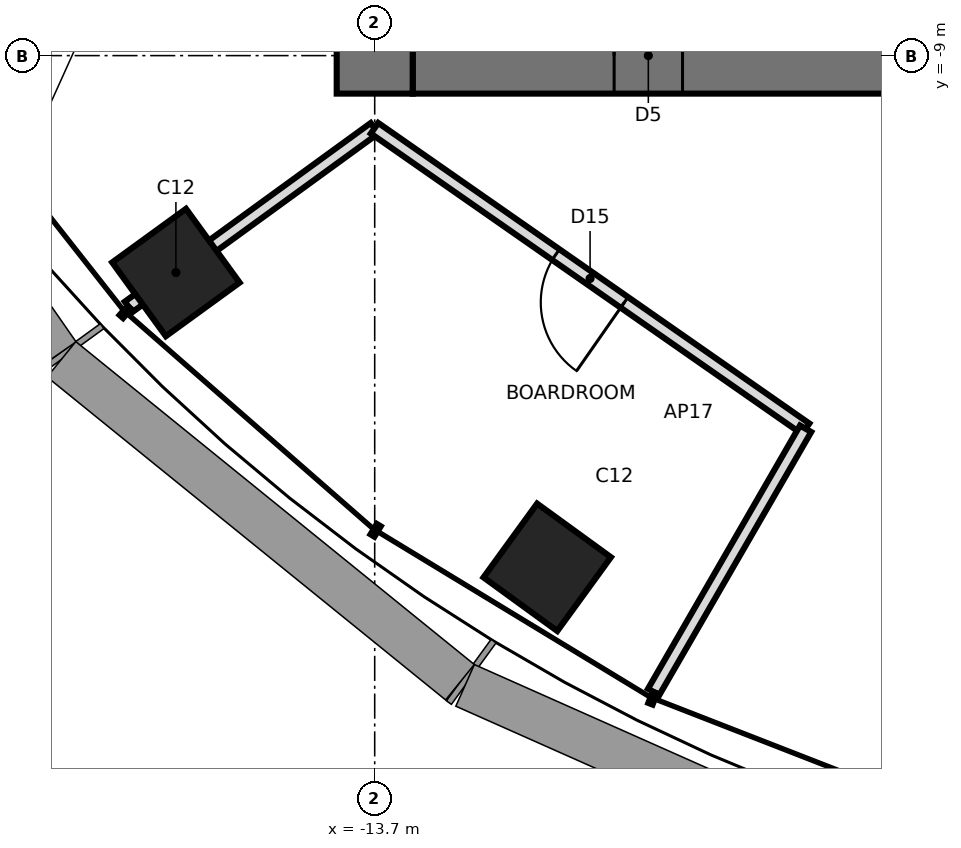
"""IFC4 building model, lengths in metres.
Left out: names, types, materials, properties, quantities, classifications, styles, units other than length and angle.
Written with IfcOpenShell. Run it as: python <this file> out.ifc"""

import sys

from ifc_helpers import new_model, si_unit, direction, frame, frame_2d, origin, origin_2d, place, context, subcontext, project, spatial, rectangle, extrude, element, fill, save


model = new_model("IFC4")
c1 = context("Model", 3, precision=1e-05, world=origin(), true_north=direction((0.0, 1.0)))
c2 = subcontext(c1, "Body", "Model", "MODEL_VIEW")
j1 = project(units=[si_unit("LENGTHUNIT", "METRE"), si_unit("PLANEANGLEUNIT", "RADIAN")], contexts=[c1])
p1 = place(None, origin())
s1 = spatial("IfcSite", under=j1, at=p1, CompositionType="ELEMENT")
p2 = place(p1, origin())
s2 = spatial("IfcBuilding", under=s1, at=p2, CompositionType="ELEMENT")
p3 = place(p2, frame((0.0, 0.0, 264.4)))
s3 = spatial("IfcBuildingStorey", under=s2, at=p3, CompositionType="ELEMENT", Elevation=264.4)
for number, where, z_axis, x_axis in (
    (1, (-16.315, -11.854, 0.0), (0.0, 0.0, 1.0), (-0.809, -0.588, 0.0)),
    (2, (-11.43, -15.733, 0.0), (0.0, 0.0, 1.0), (-0.588, -0.809, 0.0)),
):
    element("IfcColumn", number, at=place(p3, frame(where, z_axis=z_axis, x_axis=x_axis)), inside=s3, PredefinedType="COLUMN", context=c2, shape_type="SweptSolid", body=[
        extrude(rectangle(XDim=1.2, YDim=1.2, at=origin_2d()), origin(), (0.0, 0.0, 1.0), 4.2),
    ])
p4 = place(p3, frame((-13.2, -9.0, 0.0), z_axis=(0.0, 0.0, 1.0), x_axis=(1.0, 0.0, 0.0)))
e3 = element("IfcWall", 3, at=p4, inside=s3, PredefinedType="SHEAR", context=c2, shape_type="SweptSolid", body=[
    extrude(rectangle(XDim=26.4, YDim=1.0, at=frame_2d((13.2, 0.0))), origin(), (0.0, 0.0, 1.0), 4.2),
])
p5 = place(p4, frame((2.65, 0.0, 0.0)))
e4 = element("IfcOpeningElement", 4, at=p5, cuts=e3, PredefinedType="OPENING", context=c2, shape_type="SweptSolid", body=[
    extrude(rectangle(XDim=0.9, YDim=2.1, at=frame_2d((0.45, 1.05))), frame((0.0, 0.51, 0.0), z_axis=(0.0, -1.0, 0.0), x_axis=(1.0, 0.0, 0.0)), (0.0, 0.0, 1.0), 1.02),
])
p6 = place(p4, frame((9.5, 0.0, 0.0)))
e5 = element("IfcOpeningElement", 5, at=p6, cuts=e3, PredefinedType="OPENING", context=c2, shape_type="SweptSolid", body=[
    extrude(rectangle(XDim=0.9, YDim=2.1, at=frame_2d((0.45, 1.05))), frame((0.0, 0.51, 0.0), z_axis=(0.0, -1.0, 0.0), x_axis=(1.0, 0.0, 0.0)), (0.0, 0.0, 1.0), 1.02),
])
p7 = place(p4, frame((16.0, 0.0, 0.0)))
e6 = element("IfcOpeningElement", 6, at=p7, cuts=e3, PredefinedType="OPENING", context=c2, shape_type="SweptSolid", body=[
    extrude(rectangle(XDim=0.9, YDim=2.1, at=frame_2d((0.45, 1.05))), frame((0.0, 0.51, 0.0), z_axis=(0.0, -1.0, 0.0), x_axis=(1.0, 0.0, 0.0)), (0.0, 0.0, 1.0), 1.02),
])
p8 = place(p4, frame((22.85, 0.0, 0.0)))
e7 = element("IfcOpeningElement", 7, at=p8, cuts=e3, PredefinedType="OPENING", context=c2, shape_type="SweptSolid", body=[
    extrude(rectangle(XDim=0.9, YDim=2.1, at=frame_2d((0.45, 1.05))), frame((0.0, 0.51, 0.0), z_axis=(0.0, -1.0, 0.0), x_axis=(1.0, 0.0, 0.0)), (0.0, 0.0, 1.0), 1.02),
])
p9 = place(p3, frame((-13.7, 9.5, 0.0), z_axis=(0.0, 0.0, 1.0), x_axis=(0.0, -1.0, 0.0)))
e8 = element("IfcWall", 8, at=p9, inside=s3, PredefinedType="SHEAR", context=c2, shape_type="SweptSolid", body=[
    extrude(rectangle(XDim=19.0, YDim=1.0, at=frame_2d((9.5, 0.0))), origin(), (0.0, 0.0, 1.0), 4.2),
])
p10 = place(p9, frame((8.6, 0.0, 0.0)))
e9 = element("IfcOpeningElement", 9, at=p10, cuts=e8, PredefinedType="OPENING", context=c2, shape_type="SweptSolid", body=[
    extrude(rectangle(XDim=1.8, YDim=2.4, at=frame_2d((0.9, 1.2))), frame((0.0, 0.51, 0.0), z_axis=(0.0, -1.0, 0.0), x_axis=(1.0, 0.0, 0.0)), (0.0, 0.0, 1.0), 1.02),
])
p11 = place(p3, frame((-13.702, -9.955, 0.0), z_axis=(0.0, 0.0, 1.0), x_axis=(-0.809026317077, -0.587772420479, 0.0)))
e10 = element("IfcWall", 10, at=p11, inside=s3, PredefinedType="PARTITIONING", context=c2, shape_type="SweptSolid", body=[
    extrude(rectangle(XDim=4.0, YDim=0.17, at=frame_2d((2.0, 0.0))), origin(), (0.0, 0.0, 1.0), 3.24),
])
p12 = place(p3, frame((-8.031, -13.909, 0.0), z_axis=(0.0, 0.0, 1.0), x_axis=(-0.820320356129, 0.571904286852, 0.0)))
e11 = element("IfcWall", 11, at=p12, inside=s3, PredefinedType="PARTITIONING", context=c2, shape_type="SweptSolid", body=[
    extrude(rectangle(XDim=6.914, YDim=0.17, at=frame_2d((3.457, 0.0))), origin(), (0.0, 0.0, 1.0), 4.04),
])
p13 = place(p12, frame((2.907, 0.0, 0.0)))
e12 = element("IfcOpeningElement", 12, at=p13, cuts=e11, PredefinedType="OPENING", context=c2, shape_type="SweptSolid", body=[
    extrude(rectangle(XDim=1.1, YDim=2.4, at=frame_2d((0.55, 1.2))), frame((0.0, 0.095, 0.0), z_axis=(0.0, -1.0, 0.0), x_axis=(1.0, 0.0, 0.0)), (0.0, 0.0, 1.0), 0.19),
])
p14 = place(p3, frame((-10.031, -17.374, 0.0), z_axis=(0.0, 0.0, 1.0), x_axis=(0.49999894854, 0.866026010844, 0.0)))
e13 = element("IfcWall", 13, at=p14, inside=s3, PredefinedType="PARTITIONING", context=c2, shape_type="SweptSolid", body=[
    extrude(rectangle(XDim=4.0, YDim=0.17, at=frame_2d((2.0, 0.0))), origin(), (0.0, 0.0, 1.0), 4.04),
])
p15 = place(p5, origin())
e14 = element("IfcDoor", 14, at=p15, inside=s3, OperationType="SINGLE_SWING_LEFT", PredefinedType="DOOR", context=c2, shape_type="SweptSolid", body=[
    extrude(rectangle(XDim=0.82, YDim=2.06, at=frame_2d((0.45, 1.03))), frame((0.0, 0.025, 0.0), z_axis=(0.0, -1.0, 0.0), x_axis=(1.0, 0.0, 0.0)), (0.0, 0.0, 1.0), 0.05),
    extrude(rectangle(XDim=0.04, YDim=2.1, at=frame_2d((0.02, 1.05))), frame((0.0, 0.25, 0.0), z_axis=(0.0, -1.0, 0.0), x_axis=(1.0, 0.0, 0.0)), (0.0, 0.0, 1.0), 0.5),
    extrude(rectangle(XDim=0.04, YDim=2.1, at=frame_2d((0.88, 1.05))), frame((0.0, 0.25, 0.0), z_axis=(0.0, -1.0, 0.0), x_axis=(1.0, 0.0, 0.0)), (0.0, 0.0, 1.0), 0.5),
    extrude(rectangle(XDim=0.82, YDim=0.04, at=frame_2d((0.45, 2.08))), frame((0.0, 0.25, 0.0), z_axis=(0.0, -1.0, 0.0), x_axis=(1.0, 0.0, 0.0)), (0.0, 0.0, 1.0), 0.5),
])
fill(e4, e14)
p16 = place(p13, origin())
e15 = element("IfcDoor", 15, at=p16, inside=s3, OperationType="SINGLE_SWING_LEFT", PredefinedType="DOOR", context=c2, shape_type="SweptSolid", body=[
    extrude(rectangle(XDim=1.1, YDim=2.4, at=frame_2d((0.55, 1.2))), frame((0.0, 0.025, 0.0), z_axis=(0.0, -1.0, 0.0), x_axis=(1.0, 0.0, 0.0)), (0.0, 0.0, 1.0), 0.05),
])
fill(e12, e15)
save(model, sys.argv[1])
